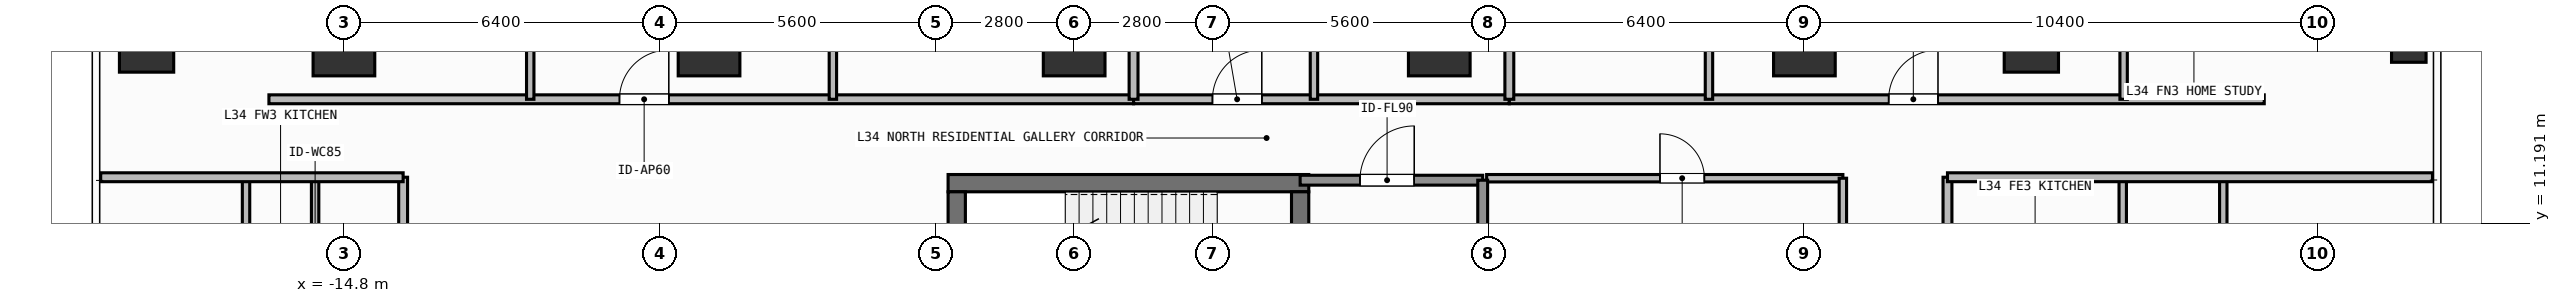
"""IFC4 building model, lengths in metres.
Left out: names, types, materials, properties, quantities, classifications, styles, units other than length and angle.
Written with IfcOpenShell. Run it as: python <this file> out.ifc"""

import sys

from ifc_helpers import new_model, si_unit, direction, frame, frame_2d, origin, origin_2d, place, context, subcontext, project, spatial, rectangle, hollow_rectangle, extrude, element, fill, save


model = new_model("IFC4")
c1 = context("Model", 3, precision=1e-05, world=origin(), true_north=direction((0.0, 1.0)))
c2 = subcontext(c1, "Body", "Model", "MODEL_VIEW")
j1 = project(units=[si_unit("LENGTHUNIT", "METRE"), si_unit("PLANEANGLEUNIT", "RADIAN")], contexts=[c1])
p1 = place(None, origin())
s1 = spatial("IfcSite", under=j1, at=p1, CompositionType="ELEMENT")
p2 = place(p1, origin())
s2 = spatial("IfcBuilding", under=s1, at=p2, CompositionType="ELEMENT")
p3 = place(p2, frame((0.0, 0.0, 136.8)))
s3 = spatial("IfcBuildingStorey", under=s2, at=p3, CompositionType="ELEMENT", Elevation=136.8)
p4 = place(p3, frame((-2.555, 12.0, 0.0), z_axis=(0.0, 0.0, 1.0), x_axis=(1.0, 0.0, 0.0)))
e1 = element("IfcWall", 1, at=p4, inside=s3, PredefinedType="SHEAR", context=c2, shape_type="SweptSolid", body=[
    extrude(rectangle(XDim=7.31, YDim=0.35, at=frame_2d((3.655, 0.0))), origin(), (0.0, 0.0, 1.0), 3.9),
])
p5 = place(p3, frame((-2.38, 8.9, 0.0), z_axis=(0.0, 0.0, 1.0), x_axis=(0.0, 1.0, 0.0)))
e2 = element("IfcWall", 2, at=p5, inside=s3, PredefinedType="SHEAR", context=c2, shape_type="SweptSolid", body=[
    extrude(rectangle(XDim=2.925, YDim=0.35, at=frame_2d((1.462, 0.0))), origin(), (0.0, 0.0, 1.0), 3.9),
])
p6 = place(p3, frame((4.58, 11.825, 0.0), z_axis=(0.0, 0.0, 1.0), x_axis=(0.0, -1.0, 0.0)))
e3 = element("IfcWall", 3, at=p6, inside=s3, PredefinedType="SHEAR", context=c2, shape_type="SweptSolid", body=[
    extrude(rectangle(XDim=2.925, YDim=0.35, at=frame_2d((1.462, 0.0))), origin(), (0.0, 0.0, 1.0), 3.9),
])
p7 = place(p6, frame((0.913, 0.0, 0.0)))
e4 = element("IfcOpeningElement", 4, at=p7, cuts=e3, PredefinedType="OPENING", context=c2, shape_type="SweptSolid", body=[
    extrude(rectangle(XDim=1.1, YDim=2.15, at=frame_2d((0.55, 1.075))), frame((0.0, 0.185, 0.0), z_axis=(0.0, -1.0, 0.0), x_axis=(1.0, 0.0, 0.0)), (0.0, 0.0, 1.0), 0.37),
])
for number, where, z_axis, x_axis in (
    (5, (-14.8, 14.8, 0.0), (0.0, 0.0, 1.0), (1.0, 0.0, 0.0)),
    (6, (-7.4, 14.8, 0.0), (0.0, 0.0, 1.0), (1.0, 0.0, 0.0)),
    (7, (0.0, 14.8, 0.0), (0.0, 0.0, 1.0), (1.0, 0.0, 0.0)),
    (8, (7.4, 14.8, 0.0), (0.0, 0.0, 1.0), (1.0, 0.0, 0.0)),
    (9, (14.8, 14.8, 0.0), (0.0, 0.0, 1.0), (1.0, 0.0, 0.0)),
):
    element("IfcColumn", number, at=place(p3, frame(where, z_axis=z_axis, x_axis=x_axis)), inside=s3, PredefinedType="COLUMN", context=c2, shape_type="SweptSolid", body=[
        extrude(rectangle(XDim=1.25, YDim=1.25, at=origin_2d()), origin(), (0.0, 0.0, 1.0), 3.9),
    ])
for number, where, z_axis, x_axis in (
    (10, (-18.8, 14.8, 0.0), (0.0, 0.0, 1.0), (1.0, 0.0, 0.0)),
    (11, (19.4, 14.8, 0.0), (0.0, 0.0, 1.0), (1.0, 0.0, 0.0)),
):
    element("IfcColumn", number, at=place(p3, frame(where, z_axis=z_axis, x_axis=x_axis)), inside=s3, PredefinedType="COLUMN", context=c2, shape_type="SweptSolid", body=[
        extrude(rectangle(XDim=1.1, YDim=1.1, at=origin_2d()), origin(), (0.0, 0.0, 1.0), 3.9),
    ])
p8 = place(p3, frame((27.05, 14.8, 0.0), z_axis=(0.0, 0.0, 1.0), x_axis=(1.0, 0.0, 0.0)))
e12 = element("IfcColumn", 12, at=p8, inside=s3, PredefinedType="COLUMN", context=c2, shape_type="SweptSolid", body=[
    extrude(hollow_rectangle(XDim=0.7, YDim=0.7, WallThickness=0.032, at=origin_2d()), origin(), (0.0, 0.0, 1.0), 3.9),
])
p9 = place(p3, frame((4.58, 12.06, 0.0), z_axis=(0.0, 0.0, 1.0), x_axis=(1.0, 0.0, 0.0)))
e13 = element("IfcWall", 13, at=p9, inside=s3, PredefinedType="SOLIDWALL", context=c2, shape_type="SweptSolid", body=[
    extrude(rectangle(XDim=3.7, YDim=0.2, at=frame_2d((1.85, 0.0))), origin(), (0.0, 0.0, 1.0), 3.68),
])
p10 = place(p9, frame((1.212, 0.0, 0.0)))
e14 = element("IfcOpeningElement", 14, at=p10, cuts=e13, PredefinedType="OPENING", context=c2, shape_type="SweptSolid", body=[
    extrude(rectangle(XDim=1.1, YDim=2.15, at=frame_2d((0.55, 1.075))), frame((0.0, 0.11, 0.0), z_axis=(0.0, -1.0, 0.0), x_axis=(1.0, 0.0, 0.0)), (0.0, 0.0, 1.0), 0.22),
])
p11 = place(p3, frame((8.36, 12.1, 0.0), z_axis=(0.0, 0.0, 1.0), x_axis=(1.0, 0.0, 0.0)))
e15 = element("IfcWall", 15, at=p11, inside=s3, PredefinedType="PARTITIONING", context=c2, shape_type="SweptSolid", body=[
    extrude(rectangle(XDim=7.22, YDim=0.15, at=frame_2d((3.61, 0.0))), origin(), (0.0, 0.0, 1.0), 3.68),
])
p12 = place(p11, frame((3.513, 0.0, 0.0)))
e16 = element("IfcOpeningElement", 16, at=p12, cuts=e15, PredefinedType="OPENING", context=c2, shape_type="SweptSolid", body=[
    extrude(rectangle(XDim=0.9, YDim=2.1, at=frame_2d((0.45, 1.05))), frame((0.0, 0.085, 0.0), z_axis=(0.0, -1.0, 0.0), x_axis=(1.0, 0.0, 0.0)), (0.0, 0.0, 1.0), 0.17),
])
p13 = place(p3, frame((-16.32, 13.7, 0.0), z_axis=(0.0, 0.0, 1.0), x_axis=(1.0, 0.0, 0.0)))
e17 = element("IfcWall", 17, at=p13, inside=s3, PredefinedType="PARTITIONING", context=c2, shape_type="SweptSolid", body=[
    extrude(rectangle(XDim=17.524, YDim=0.18, at=frame_2d((8.762, 0.0))), origin(), (0.0, 0.0, 1.0), 3.68),
])
p14 = place(p13, frame((7.104, 0.0, 0.0)))
e18 = element("IfcOpeningElement", 18, at=p14, cuts=e17, PredefinedType="OPENING", context=c2, shape_type="SweptSolid", body=[
    extrude(rectangle(XDim=1.0, YDim=2.2, at=frame_2d((0.5, 1.1))), frame((0.0, 0.1, 0.0), z_axis=(0.0, -1.0, 0.0), x_axis=(1.0, 0.0, 0.0)), (0.0, 0.0, 1.0), 0.2),
])
p15 = place(p3, frame((-11.024, 13.7, 0.0), z_axis=(0.0, 0.0, 1.0), x_axis=(0.0, 1.0, 0.0)))
e19 = element("IfcWall", 19, at=p15, inside=s3, PredefinedType="PARTITIONING", context=c2, shape_type="SweptSolid", body=[
    extrude(rectangle(XDim=5.69, YDim=0.15, at=frame_2d((2.845, 0.0))), origin(), (0.0, 0.0, 1.0), 3.68),
])
p16 = place(p15, frame((2.42, 0.0, 0.0)))
e20 = element("IfcOpeningElement", 20, at=p16, cuts=e19, PredefinedType="OPENING", context=c2, shape_type="SweptSolid", body=[
    extrude(rectangle(XDim=0.85, YDim=2.1, at=frame_2d((0.425, 1.05))), frame((0.0, 0.085, 0.0), z_axis=(0.0, -1.0, 0.0), x_axis=(1.0, 0.0, 0.0)), (0.0, 0.0, 1.0), 0.17),
])
p17 = place(p3, frame((-4.89, 13.7, 0.0), z_axis=(0.0, 0.0, 1.0), x_axis=(0.0, 1.0, 0.0)))
e21 = element("IfcWall", 21, at=p17, inside=s3, PredefinedType="PARTITIONING", context=c2, shape_type="SweptSolid", body=[
    extrude(rectangle(XDim=3.983, YDim=0.15, at=frame_2d((1.992, 0.0))), origin(), (0.0, 0.0, 1.0), 3.68),
])
p18 = place(p17, frame((1.566, 0.0, 0.0)))
e22 = element("IfcOpeningElement", 22, at=p18, cuts=e21, PredefinedType="OPENING", context=c2, shape_type="SweptSolid", body=[
    extrude(rectangle(XDim=0.85, YDim=2.1, at=frame_2d((0.425, 1.05))), frame((0.0, 0.085, 0.0), z_axis=(0.0, -1.0, 0.0), x_axis=(1.0, 0.0, 0.0)), (0.0, 0.0, 1.0), 0.17),
])
p19 = place(p3, frame((1.204, 13.7, 0.0), z_axis=(0.0, 0.0, 1.0), x_axis=(1.0, 0.0, 0.0)))
e23 = element("IfcWall", 23, at=p19, inside=s3, PredefinedType="PARTITIONING", context=c2, shape_type="SweptSolid", body=[
    extrude(rectangle(XDim=7.616, YDim=0.18, at=frame_2d((3.808, 0.0))), origin(), (0.0, 0.0, 1.0), 3.68),
])
p20 = place(p19, frame((1.599, 0.0, 0.0)))
e24 = element("IfcOpeningElement", 24, at=p20, cuts=e23, PredefinedType="OPENING", context=c2, shape_type="SweptSolid", body=[
    extrude(rectangle(XDim=1.0, YDim=2.2, at=frame_2d((0.5, 1.1))), frame((0.0, 0.1, 0.0), z_axis=(0.0, -1.0, 0.0), x_axis=(1.0, 0.0, 0.0)), (0.0, 0.0, 1.0), 0.2),
])
p21 = place(p3, frame((4.86, 13.7, 0.0), z_axis=(0.0, 0.0, 1.0), x_axis=(0.0, 1.0, 0.0)))
e25 = element("IfcWall", 25, at=p21, inside=s3, PredefinedType="PARTITIONING", context=c2, shape_type="SweptSolid", body=[
    extrude(rectangle(XDim=3.129, YDim=0.15, at=frame_2d((1.564, 0.0))), origin(), (0.0, 0.0, 1.0), 3.68),
])
p22 = place(p21, frame((1.229, 0.0, 0.0)))
e26 = element("IfcOpeningElement", 26, at=p22, cuts=e25, PredefinedType="OPENING", context=c2, shape_type="SweptSolid", body=[
    extrude(rectangle(XDim=0.85, YDim=2.1, at=frame_2d((0.425, 1.05))), frame((0.0, 0.085, 0.0), z_axis=(0.0, -1.0, 0.0), x_axis=(1.0, 0.0, 0.0)), (0.0, 0.0, 1.0), 0.17),
])
p23 = place(p3, frame((8.82, 13.7, 0.0), z_axis=(0.0, 0.0, 1.0), x_axis=(1.0, 0.0, 0.0)))
e27 = element("IfcWall", 27, at=p23, inside=s3, PredefinedType="PARTITIONING", context=c2, shape_type="SweptSolid", body=[
    extrude(rectangle(XDim=15.3, YDim=0.18, at=frame_2d((7.65, 0.0))), origin(), (0.0, 0.0, 1.0), 3.68),
])
p24 = place(p23, frame((7.688, 0.0, 0.0)))
e28 = element("IfcOpeningElement", 28, at=p24, cuts=e27, PredefinedType="OPENING", context=c2, shape_type="SweptSolid", body=[
    extrude(rectangle(XDim=1.0, YDim=2.2, at=frame_2d((0.5, 1.1))), frame((0.0, 0.1, 0.0), z_axis=(0.0, -1.0, 0.0), x_axis=(1.0, 0.0, 0.0)), (0.0, 0.0, 1.0), 0.2),
])
p25 = place(p3, frame((12.866, 13.7, 0.0), z_axis=(0.0, 0.0, 1.0), x_axis=(0.0, 1.0, 0.0)))
e29 = element("IfcWall", 29, at=p25, inside=s3, PredefinedType="PARTITIONING", context=c2, shape_type="SweptSolid", body=[
    extrude(rectangle(XDim=5.755, YDim=0.15, at=frame_2d((2.877, 0.0))), origin(), (0.0, 0.0, 1.0), 3.68),
])
p26 = place(p25, frame((2.452, 0.0, 0.0)))
e30 = element("IfcOpeningElement", 30, at=p26, cuts=e29, PredefinedType="OPENING", context=c2, shape_type="SweptSolid", body=[
    extrude(rectangle(XDim=0.85, YDim=2.1, at=frame_2d((0.425, 1.05))), frame((0.0, 0.085, 0.0), z_axis=(0.0, -1.0, 0.0), x_axis=(1.0, 0.0, 0.0)), (0.0, 0.0, 1.0), 0.17),
])
p27 = place(p3, frame((21.27, 13.7, 0.0), z_axis=(0.0, 0.0, 1.0), x_axis=(0.0, 1.0, 0.0)))
e31 = element("IfcWall", 31, at=p27, inside=s3, PredefinedType="PARTITIONING", context=c2, shape_type="SweptSolid", body=[
    extrude(rectangle(XDim=3.223, YDim=0.15, at=frame_2d((1.612, 0.0))), origin(), (0.0, 0.0, 1.0), 3.68),
])
p28 = place(p27, frame((1.7, 0.0, 0.0)))
e32 = element("IfcOpeningElement", 32, at=p28, cuts=e31, PredefinedType="OPENING", context=c2, shape_type="SweptSolid", body=[
    extrude(rectangle(XDim=0.85, YDim=2.1, at=frame_2d((0.425, 1.05))), frame((0.0, 0.085, 0.0), z_axis=(0.0, -1.0, 0.0), x_axis=(1.0, 0.0, 0.0)), (0.0, 0.0, 1.0), 0.17),
])
p29 = place(p3, frame((-13.6, 4.04, 0.0), z_axis=(0.0, 0.0, 1.0), x_axis=(0.0, 1.0, 0.0)))
e33 = element("IfcWall", 33, at=p29, inside=s3, PredefinedType="PARTITIONING", context=c2, shape_type="SweptSolid", body=[
    extrude(rectangle(XDim=8.08, YDim=0.18, at=frame_2d((4.04, 0.0))), origin(), (0.0, 0.0, 1.0), 3.68),
])
p30 = place(p29, frame((1.583, 0.0, 0.0)))
e34 = element("IfcOpeningElement", 34, at=p30, cuts=e33, PredefinedType="OPENING", context=c2, shape_type="SweptSolid", body=[
    extrude(rectangle(XDim=1.0, YDim=2.2, at=frame_2d((0.5, 1.1))), frame((0.0, 0.1, 0.0), z_axis=(0.0, -1.0, 0.0), x_axis=(1.0, 0.0, 0.0)), (0.0, 0.0, 1.0), 0.2),
])
p31 = place(p3, frame((17.7, 4.04, 0.0), z_axis=(0.0, 0.0, 1.0), x_axis=(0.0, 1.0, 0.0)))
e35 = element("IfcWall", 35, at=p31, inside=s3, PredefinedType="PARTITIONING", context=c2, shape_type="SweptSolid", body=[
    extrude(rectangle(XDim=8.08, YDim=0.18, at=frame_2d((4.04, 0.0))), origin(), (0.0, 0.0, 1.0), 3.68),
])
p32 = place(p31, frame((1.761, 0.0, 0.0)))
e36 = element("IfcOpeningElement", 36, at=p32, cuts=e35, PredefinedType="OPENING", context=c2, shape_type="SweptSolid", body=[
    extrude(rectangle(XDim=1.0, YDim=2.2, at=frame_2d((0.5, 1.1))), frame((0.0, 0.1, 0.0), z_axis=(0.0, -1.0, 0.0), x_axis=(1.0, 0.0, 0.0)), (0.0, 0.0, 1.0), 0.2),
])
p33 = place(p3, frame((8.28, 8.875, 0.0), z_axis=(0.0, 0.0, 1.0), x_axis=(0.0, 1.0, 0.0)))
e37 = element("IfcWall", 37, at=p33, inside=s3, PredefinedType="SOLIDWALL", context=c2, shape_type="SweptSolid", body=[
    extrude(rectangle(XDim=3.185, YDim=0.2, at=frame_2d((1.593, 0.0))), origin(), (0.0, 0.0, 1.0), 3.68),
])
p34 = place(p3, frame((15.58, 5.85, 0.0), z_axis=(0.0, 0.0, 1.0), x_axis=(0.0, 1.0, 0.0)))
e38 = element("IfcWall", 38, at=p34, inside=s3, PredefinedType="PARTITIONING", context=c2, shape_type="SweptSolid", body=[
    extrude(rectangle(XDim=6.25, YDim=0.15, at=frame_2d((3.125, 0.0))), origin(), (0.0, 0.0, 1.0), 3.68),
])
for number, where, z_axis, x_axis in (
    (39, (1.204, 13.7, 0.0), (0.0, 0.0, 1.0), (0.0, 1.0, 0.0)),
    (40, (8.82, 13.7, 0.0), (0.0, 0.0, 1.0), (0.0, 1.0, 0.0)),
):
    element("IfcWall", number, at=place(p3, frame(where, z_axis=z_axis, x_axis=x_axis)), inside=s3, PredefinedType="PARTITIONING", context=c2, shape_type="SweptSolid", body=[
        extrude(rectangle(XDim=9.93, YDim=0.18, at=frame_2d((4.965, 0.0))), origin(), (0.0, 0.0, 1.0), 3.68),
    ])
p35 = place(p3, frame((-15.384, 8.394, 0.0), z_axis=(0.0, 0.0, 1.0), x_axis=(0.0, 1.0, 0.0)))
e41 = element("IfcWall", 41, at=p35, inside=s3, PredefinedType="PARTITIONING", context=c2, shape_type="SweptSolid", body=[
    extrude(rectangle(XDim=3.726, YDim=0.15, at=frame_2d((1.863, 0.0))), origin(), (0.0, 0.0, 1.0), 3.68),
])
p36 = place(p35, frame((1.353, 0.0, 0.0)))
e42 = element("IfcOpeningElement", 42, at=p36, cuts=e41, PredefinedType="OPENING", context=c2, shape_type="SweptSolid", body=[
    extrude(rectangle(XDim=0.85, YDim=2.1, at=frame_2d((0.425, 1.05))), frame((0.0, 0.085, 0.0), z_axis=(0.0, -1.0, 0.0), x_axis=(1.0, 0.0, 0.0)), (0.0, 0.0, 1.0), 0.17),
])
p37 = place(p3, frame((-16.784, 8.394, 0.0), z_axis=(0.0, 0.0, 1.0), x_axis=(0.0, 1.0, 0.0)))
e43 = element("IfcWall", 43, at=p37, inside=s3, PredefinedType="PARTITIONING", context=c2, shape_type="SweptSolid", body=[
    extrude(rectangle(XDim=3.726, YDim=0.15, at=frame_2d((1.863, 0.0))), origin(), (0.0, 0.0, 1.0), 3.68),
])
p38 = place(p3, frame((-19.73, 12.12, 0.0), z_axis=(0.0, 0.0, 1.0), x_axis=(1.0, 0.0, 0.0)))
e44 = element("IfcWall", 44, at=p38, inside=s3, PredefinedType="PARTITIONING", context=c2, shape_type="SweptSolid", body=[
    extrude(rectangle(XDim=6.13, YDim=0.18, at=frame_2d((3.065, 0.0))), origin(), (0.0, 0.0, 1.0), 3.68),
])
for number, where, z_axis, x_axis in (
    (45, (21.252, 9.32, 0.0), (0.0, 0.0, 1.0), (0.0, 1.0, 0.0)),
    (46, (23.29, 9.32, 0.0), (0.0, 0.0, 1.0), (0.0, 1.0, 0.0)),
):
    element("IfcWall", number, at=place(p3, frame(where, z_axis=z_axis, x_axis=x_axis)), inside=s3, PredefinedType="PARTITIONING", context=c2, shape_type="SweptSolid", body=[
        extrude(rectangle(XDim=2.8, YDim=0.15, at=frame_2d((1.4, 0.0))), origin(), (0.0, 0.0, 1.0), 3.68),
    ])
p39 = place(p3, frame((17.7, 12.12, 0.0), z_axis=(0.0, 0.0, 1.0), x_axis=(1.0, 0.0, 0.0)))
e47 = element("IfcWall", 47, at=p39, inside=s3, PredefinedType="PARTITIONING", context=c2, shape_type="SweptSolid", body=[
    extrude(rectangle(XDim=9.83, YDim=0.18, at=frame_2d((4.915, 0.0))), origin(), (0.0, 0.0, 1.0), 3.68),
])
p40 = place(p10, origin())
e48 = element("IfcDoor", 48, at=p40, inside=s3, OperationType="SINGLE_SWING_RIGHT", PredefinedType="DOOR", context=c2, shape_type="SweptSolid", body=[
    extrude(rectangle(XDim=1.1, YDim=2.15, at=frame_2d((0.55, 1.075))), frame((0.0, 0.025, 0.0), z_axis=(0.0, -1.0, 0.0), x_axis=(1.0, 0.0, 0.0)), (0.0, 0.0, 1.0), 0.05),
])
fill(e14, e48)
p41 = place(p12, origin())
e49 = element("IfcDoor", 49, at=p41, inside=s3, OperationType="SINGLE_SWING_LEFT", PredefinedType="DOOR", context=c2, shape_type="SweptSolid", body=[
    extrude(rectangle(XDim=0.9, YDim=2.1, at=frame_2d((0.45, 1.05))), frame((0.0, 0.025, 0.0), z_axis=(0.0, -1.0, 0.0), x_axis=(1.0, 0.0, 0.0)), (0.0, 0.0, 1.0), 0.05),
])
fill(e16, e49)
p42 = place(p14, origin())
e50 = element("IfcDoor", 50, at=p42, inside=s3, OperationType="SINGLE_SWING_RIGHT", PredefinedType="DOOR", context=c2, shape_type="SweptSolid", body=[
    extrude(rectangle(XDim=1.0, YDim=2.2, at=frame_2d((0.5, 1.1))), frame((0.0, 0.025, 0.0), z_axis=(0.0, -1.0, 0.0), x_axis=(1.0, 0.0, 0.0)), (0.0, 0.0, 1.0), 0.05),
])
fill(e18, e50)
p43 = place(p20, origin())
e51 = element("IfcDoor", 51, at=p43, inside=s3, OperationType="SINGLE_SWING_RIGHT", PredefinedType="DOOR", context=c2, shape_type="SweptSolid", body=[
    extrude(rectangle(XDim=1.0, YDim=2.2, at=frame_2d((0.5, 1.1))), frame((0.0, 0.025, 0.0), z_axis=(0.0, -1.0, 0.0), x_axis=(1.0, 0.0, 0.0)), (0.0, 0.0, 1.0), 0.05),
])
fill(e24, e51)
p44 = place(p24, origin())
e52 = element("IfcDoor", 52, at=p44, inside=s3, OperationType="SINGLE_SWING_RIGHT", PredefinedType="DOOR", context=c2, shape_type="SweptSolid", body=[
    extrude(rectangle(XDim=1.0, YDim=2.2, at=frame_2d((0.5, 1.1))), frame((0.0, 0.025, 0.0), z_axis=(0.0, -1.0, 0.0), x_axis=(1.0, 0.0, 0.0)), (0.0, 0.0, 1.0), 0.05),
])
fill(e28, e52)
save(model, sys.argv[1])
